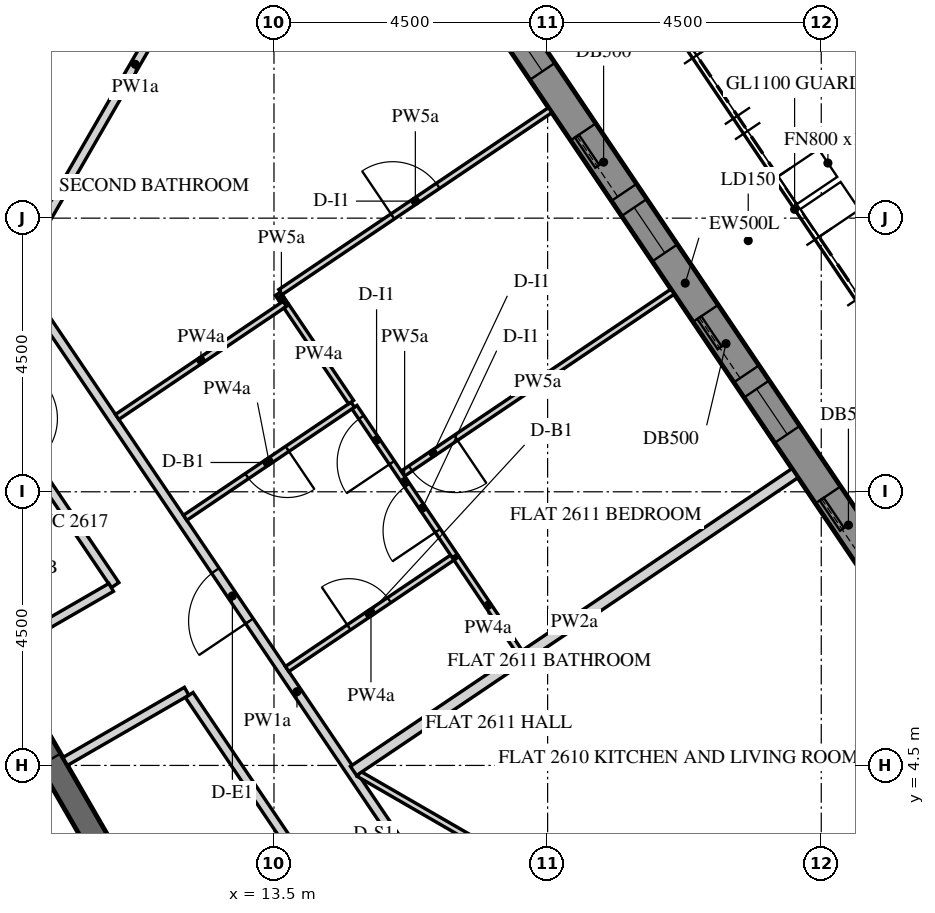
"""IFC4 building model, lengths in metres.
Left out: names, types, materials, properties, quantities, classifications, styles, units other than length and angle.
Written with IfcOpenShell. Run it as: python <this file> out.ifc"""

import sys

from ifc_helpers import new_model, si_unit, direction, frame, frame_2d, origin, place, context, subcontext, project, spatial, polyline, rectangle, outline, extrude, element, fill, save


model = new_model("IFC4")
c1 = context("Model", 3, precision=1e-05, world=origin(), true_north=direction((0.0, 1.0)))
c2 = subcontext(c1, "Body", "Model", "MODEL_VIEW")
j1 = project(units=[si_unit("LENGTHUNIT", "METRE"), si_unit("PLANEANGLEUNIT", "RADIAN")], contexts=[c1])
p1 = place(None, origin())
s1 = spatial("IfcSite", under=j1, at=p1, CompositionType="ELEMENT")
p2 = place(p1, origin())
s2 = spatial("IfcBuilding", under=s1, at=p2, CompositionType="ELEMENT")
p3 = place(p2, frame((0.0, 0.0, 326.4)))
s3 = spatial("IfcBuildingStorey", under=s2, at=p3, CompositionType="ELEMENT", Elevation=326.4)
p4 = place(p3, frame((26.706, 2.879, -0.15), z_axis=(0.0, 0.0, 1.0), x_axis=(-0.559197891507, 0.829034208061, 0.0)))
e1 = element("IfcWall", 1, at=p4, inside=s3, PredefinedType="SOLIDWALL", context=c2, shape_type="SweptSolid", body=[
    extrude(outline(polyline([(0.25, -0.25), (22.795, -0.25), (23.295, 0.25), (-0.25, 0.25), (0.25, -0.25)])), origin(), (0.0, 0.0, 1.0), 3.9),
])
p5 = place(p4, frame((1.323, 0.0, 1.05)))
e2 = element("IfcOpeningElement", 2, at=p5, cuts=e1, PredefinedType="OPENING", context=c2, shape_type="SweptSolid", body=[
    extrude(rectangle(XDim=0.9, YDim=1.5, at=frame_2d((0.45, 0.75))), frame((0.0, 0.26, 0.0), z_axis=(0.0, -1.0, 0.0), x_axis=(1.0, 0.0, 0.0)), (0.0, 0.0, 1.0), 0.52),
])
p6 = place(p4, frame((2.522, 0.0, 0.15)))
e3 = element("IfcOpeningElement", 3, at=p6, cuts=e1, PredefinedType="OPENING", context=c2, shape_type="SweptSolid", body=[
    extrude(rectangle(XDim=1.2, YDim=2.4, at=frame_2d((0.6, 1.2))), frame((0.0, 0.26, 0.0), z_axis=(0.0, -1.0, 0.0), x_axis=(1.0, 0.0, 0.0)), (0.0, 0.0, 1.0), 0.52),
])
p7 = place(p4, frame((4.922, 0.0, 1.05)))
e4 = element("IfcOpeningElement", 4, at=p7, cuts=e1, PredefinedType="OPENING", context=c2, shape_type="SweptSolid", body=[
    extrude(rectangle(XDim=0.9, YDim=1.5, at=frame_2d((0.45, 0.75))), frame((0.0, 0.26, 0.0), z_axis=(0.0, -1.0, 0.0), x_axis=(1.0, 0.0, 0.0)), (0.0, 0.0, 1.0), 0.52),
])
p8 = place(p4, frame((6.122, 0.0, 0.15)))
e5 = element("IfcOpeningElement", 5, at=p8, cuts=e1, PredefinedType="OPENING", context=c2, shape_type="SweptSolid", body=[
    extrude(rectangle(XDim=1.2, YDim=2.4, at=frame_2d((0.6, 1.2))), frame((0.0, 0.26, 0.0), z_axis=(0.0, -1.0, 0.0), x_axis=(1.0, 0.0, 0.0)), (0.0, 0.0, 1.0), 0.52),
])
p9 = place(p4, frame((8.522, 0.0, 1.05)))
e6 = element("IfcOpeningElement", 6, at=p9, cuts=e1, PredefinedType="OPENING", context=c2, shape_type="SweptSolid", body=[
    extrude(rectangle(XDim=0.9, YDim=1.5, at=frame_2d((0.45, 0.75))), frame((0.0, 0.26, 0.0), z_axis=(0.0, -1.0, 0.0), x_axis=(1.0, 0.0, 0.0)), (0.0, 0.0, 1.0), 0.52),
])
p10 = place(p4, frame((9.722, 0.0, 0.15)))
e7 = element("IfcOpeningElement", 7, at=p10, cuts=e1, PredefinedType="OPENING", context=c2, shape_type="SweptSolid", body=[
    extrude(rectangle(XDim=1.2, YDim=2.4, at=frame_2d((0.6, 1.2))), frame((0.0, 0.26, 0.0), z_axis=(0.0, -1.0, 0.0), x_axis=(1.0, 0.0, 0.0)), (0.0, 0.0, 1.0), 0.52),
])
p11 = place(p4, frame((12.122, 0.0, 1.05)))
e8 = element("IfcOpeningElement", 8, at=p11, cuts=e1, PredefinedType="OPENING", context=c2, shape_type="SweptSolid", body=[
    extrude(rectangle(XDim=0.9, YDim=1.5, at=frame_2d((0.45, 0.75))), frame((0.0, 0.26, 0.0), z_axis=(0.0, -1.0, 0.0), x_axis=(1.0, 0.0, 0.0)), (0.0, 0.0, 1.0), 0.52),
])
p12 = place(p4, frame((13.323, 0.0, 0.15)))
e9 = element("IfcOpeningElement", 9, at=p12, cuts=e1, PredefinedType="OPENING", context=c2, shape_type="SweptSolid", body=[
    extrude(rectangle(XDim=1.2, YDim=2.4, at=frame_2d((0.6, 1.2))), frame((0.0, 0.26, 0.0), z_axis=(0.0, -1.0, 0.0), x_axis=(1.0, 0.0, 0.0)), (0.0, 0.0, 1.0), 0.52),
])
p13 = place(p4, frame((15.722, 0.0, 1.05)))
e10 = element("IfcOpeningElement", 10, at=p13, cuts=e1, PredefinedType="OPENING", context=c2, shape_type="SweptSolid", body=[
    extrude(rectangle(XDim=0.9, YDim=1.5, at=frame_2d((0.45, 0.75))), frame((0.0, 0.26, 0.0), z_axis=(0.0, -1.0, 0.0), x_axis=(1.0, 0.0, 0.0)), (0.0, 0.0, 1.0), 0.52),
])
p14 = place(p4, frame((16.922, 0.0, 0.15)))
e11 = element("IfcOpeningElement", 11, at=p14, cuts=e1, PredefinedType="OPENING", context=c2, shape_type="SweptSolid", body=[
    extrude(rectangle(XDim=1.2, YDim=2.4, at=frame_2d((0.6, 1.2))), frame((0.0, 0.26, 0.0), z_axis=(0.0, -1.0, 0.0), x_axis=(1.0, 0.0, 0.0)), (0.0, 0.0, 1.0), 0.52),
])
p15 = place(p4, frame((19.323, 0.0, 1.05)))
e12 = element("IfcOpeningElement", 12, at=p15, cuts=e1, PredefinedType="OPENING", context=c2, shape_type="SweptSolid", body=[
    extrude(rectangle(XDim=0.9, YDim=1.5, at=frame_2d((0.45, 0.75))), frame((0.0, 0.26, 0.0), z_axis=(0.0, -1.0, 0.0), x_axis=(1.0, 0.0, 0.0)), (0.0, 0.0, 1.0), 0.52),
])
p16 = place(p4, frame((20.522, 0.0, 0.15)))
e13 = element("IfcOpeningElement", 13, at=p16, cuts=e1, PredefinedType="OPENING", context=c2, shape_type="SweptSolid", body=[
    extrude(rectangle(XDim=1.2, YDim=2.4, at=frame_2d((0.6, 1.2))), frame((0.0, 0.26, 0.0), z_axis=(0.0, -1.0, 0.0), x_axis=(1.0, 0.0, 0.0)), (0.0, 0.0, 1.0), 0.52),
])
p17 = place(p3, frame((12.471, 0.0, -0.15), z_axis=(0.0, 0.0, 1.0), x_axis=(-0.499996419489, 0.866027470984, 0.0)))
e14 = element("IfcWall", 14, at=p17, inside=s3, PredefinedType="SHEAR", context=c2, shape_type="SweptSolid", body=[
    extrude(outline(polyline([(-0.115, -0.2), (12.586, -0.2), (12.355, 0.2), (0.115, 0.2), (-0.115, -0.2)])), origin(), (0.0, 0.0, 1.0), 3.9),
])
p18 = place(p17, frame((5.306, 0.0, 0.15)))
e15 = element("IfcOpeningElement", 15, at=p18, cuts=e14, PredefinedType="OPENING", context=c2, shape_type="SweptSolid", body=[
    extrude(rectangle(XDim=1.8, YDim=2.4, at=frame_2d((0.9, 1.2))), frame((0.0, 0.21, 0.0), z_axis=(0.0, -1.0, 0.0), x_axis=(1.0, 0.0, 0.0)), (0.0, 0.0, 1.0), 0.42),
])
p19 = place(p3, frame((6.351, 11.0, -0.15), z_axis=(0.0, 0.0, 1.0), x_axis=(0.499998894578, 0.866026041999, 0.0)))
e16 = element("IfcWall", 16, at=p19, inside=s3, PredefinedType="SHEAR", context=c2, shape_type="SweptSolid", body=[
    extrude(rectangle(XDim=15.544, YDim=0.4, at=frame_2d((7.772, 0.0))), origin(), (0.0, 0.0, 1.0), 3.9),
])
p20 = place(p19, frame((6.872, 0.0, 0.15)))
e17 = element("IfcOpeningElement", 17, at=p20, cuts=e16, PredefinedType="OPENING", context=c2, shape_type="SweptSolid", body=[
    extrude(rectangle(XDim=1.8, YDim=2.4, at=frame_2d((0.9, 1.2))), frame((0.0, 0.21, 0.0), z_axis=(0.0, -1.0, 0.0), x_axis=(1.0, 0.0, 0.0)), (0.0, 0.0, 1.0), 0.42),
])
p21 = place(p3, frame((18.521, -1.171, 0.0), z_axis=(0.0, 0.0, 1.0), x_axis=(-0.559191021435, 0.829038842001, 0.0)))
e18 = element("IfcWall", 18, at=p21, inside=s3, PredefinedType="PARTITIONING", context=c2, shape_type="SweptSolid", body=[
    extrude(rectangle(XDim=16.605, YDim=0.15, at=frame_2d((8.303, 0.0))), origin(), (0.0, 0.0, 1.0), 2.838),
])
p22 = place(p21, frame((9.703, 0.0, 0.0)))
e19 = element("IfcOpeningElement", 19, at=p22, cuts=e18, PredefinedType="OPENING", context=c2, shape_type="SweptSolid", body=[
    extrude(rectangle(XDim=1.0, YDim=2.1, at=frame_2d((0.5, 1.05))), frame((0.0, 0.085, 0.0), z_axis=(0.0, -1.0, 0.0), x_axis=(1.0, 0.0, 0.0)), (0.0, 0.0, 1.0), 0.17),
])
p23 = place(p3, frame((9.277, 12.668, 0.0), z_axis=(0.0, 0.0, 1.0), x_axis=(0.499991012162, 0.866030592853, 0.0)))
e20 = element("IfcWall", 20, at=p23, inside=s3, PredefinedType="PARTITIONING", context=c2, shape_type="SweptSolid", body=[
    extrude(rectangle(XDim=7.764, YDim=0.15, at=frame_2d((3.882, 0.0))), origin(), (0.0, 0.0, 1.0), 2.838),
])
p24 = place(p3, frame((10.066, 4.566, 0.0), z_axis=(0.0, 0.0, 1.0), x_axis=(0.866034075723, 0.499984979461, 0.0)))
e21 = element("IfcWall", 21, at=p24, inside=s3, PredefinedType="PARTITIONING", context=c2, shape_type="SweptSolid", body=[
    extrude(rectangle(XDim=2.308, YDim=0.15, at=frame_2d((1.154, 0.0))), origin(), (0.0, 0.0, 1.0), 2.838),
])
p25 = place(p3, frame((12.106, 5.657, 0.0), z_axis=(0.0, 0.0, 1.0), x_axis=(0.559202573837, -0.829031049728, 0.0)))
e22 = element("IfcWall", 22, at=p25, inside=s3, PredefinedType="PARTITIONING", context=c2, shape_type="SweptSolid", body=[
    extrude(rectangle(XDim=8.394, YDim=0.15, at=frame_2d((4.197, 0.0))), origin(), (0.0, 0.0, 1.0), 2.838),
])
p26 = place(p25, frame((3.747, 0.0, 0.0)))
e23 = element("IfcOpeningElement", 23, at=p26, cuts=e22, PredefinedType="OPENING", context=c2, shape_type="SweptSolid", body=[
    extrude(rectangle(XDim=0.9, YDim=2.1, at=frame_2d((0.45, 1.05))), frame((0.0, 0.085, 0.0), z_axis=(0.0, -1.0, 0.0), x_axis=(1.0, 0.0, 0.0)), (0.0, 0.0, 1.0), 0.17),
])
p27 = place(p3, frame((7.694, 12.199, 0.0), z_axis=(0.0, 0.0, 1.0), x_axis=(0.55920112739, -0.829032025392, 0.0)))
e24 = element("IfcWall", 24, at=p27, inside=s3, PredefinedType="PARTITIONING", context=c2, shape_type="SweptSolid", body=[
    extrude(rectangle(XDim=5.71, YDim=0.15, at=frame_2d((2.855, 0.0))), origin(), (0.0, 0.0, 1.0), 2.838),
])
p28 = place(p27, frame((2.405, 0.0, 0.0)))
e25 = element("IfcOpeningElement", 25, at=p28, cuts=e24, PredefinedType="OPENING", context=c2, shape_type="SweptSolid", body=[
    extrude(rectangle(XDim=0.9, YDim=2.1, at=frame_2d((0.45, 1.05))), frame((0.0, 0.085, 0.0), z_axis=(0.0, -1.0, 0.0), x_axis=(1.0, 0.0, 0.0)), (0.0, 0.0, 1.0), 0.17),
])
p29 = place(p3, frame((10.822, 7.427, 0.0), z_axis=(0.0, 0.0, 1.0), x_axis=(-0.866016009309, -0.500016271356, 0.0)))
e26 = element("IfcWall", 26, at=p29, inside=s3, PredefinedType="PARTITIONING", context=c2, shape_type="SweptSolid", body=[
    extrude(rectangle(XDim=2.086, YDim=0.15, at=frame_2d((1.043, 0.0))), origin(), (0.0, 0.0, 1.0), 2.838),
])
p30 = place(p3, frame((14.896, 4.361, 0.0), z_axis=(0.0, 0.0, 1.0), x_axis=(0.866020874699, -0.500007844523, 0.0)))
e27 = element("IfcWall", 27, at=p30, inside=s3, PredefinedType="PARTITIONING", context=c2, shape_type="SweptSolid", body=[
    extrude(rectangle(XDim=9.38, YDim=0.1, at=frame_2d((4.69, 0.0))), origin(), (0.0, 0.0, 1.0), 2.838),
])
p31 = place(p3, frame((22.069, 9.307, 0.0), z_axis=(0.0, 0.0, 1.0), x_axis=(-0.829040270775, -0.559188903174, 0.0)))
e28 = element("IfcWall", 28, at=p31, inside=s3, PredefinedType="PARTITIONING", context=c2, shape_type="SweptSolid", body=[
    extrude(rectangle(XDim=8.758, YDim=0.18, at=frame_2d((4.379, 0.0))), origin(), (0.0, 0.0, 1.0), 2.838),
])
p32 = place(p3, frame((13.678, 12.089, 0.0), z_axis=(0.0, 0.0, 1.0), x_axis=(-0.559431350648, 0.828876688001, 0.0)))
e29 = element("IfcWall", 29, at=p32, inside=s3, PredefinedType="PARTITIONING", context=c2, shape_type="SweptSolid", body=[
    extrude(rectangle(XDim=0.202, YDim=0.1, at=frame_2d((0.101, 0.0))), origin(), (0.0, 0.0, 1.0), 2.838),
])
p33 = place(p3, frame((13.607, 12.284, 0.0), z_axis=(0.0, 0.0, 1.0), x_axis=(0.829033261565, 0.559199294722, 0.0)))
e30 = element("IfcWall", 30, at=p33, inside=s3, PredefinedType="PARTITIONING", context=c2, shape_type="SweptSolid", body=[
    extrude(rectangle(XDim=5.35, YDim=0.1, at=frame_2d((2.675, 0.0))), origin(), (0.0, 0.0, 1.0), 2.838),
])
p34 = place(p33, frame((2.225, 0.0, 0.0)))
e31 = element("IfcOpeningElement", 31, at=p34, cuts=e30, PredefinedType="OPENING", context=c2, shape_type="SweptSolid", body=[
    extrude(rectangle(XDim=0.9, YDim=2.1, at=frame_2d((0.45, 1.05))), frame((0.0, 0.06, 0.0), z_axis=(0.0, -1.0, 0.0), x_axis=(1.0, 0.0, 0.0)), (0.0, 0.0, 1.0), 0.12),
])
p35 = place(p3, frame((10.921, 10.231, 0.0), z_axis=(0.0, 0.0, 1.0), x_axis=(0.829010378124, 0.559233218759, 0.0)))
e32 = element("IfcWall", 32, at=p35, inside=s3, PredefinedType="PARTITIONING", context=c2, shape_type="SweptSolid", body=[
    extrude(rectangle(XDim=3.325, YDim=0.1, at=frame_2d((1.663, 0.0))), origin(), (0.0, 0.0, 1.0), 2.838),
])
p36 = place(p3, frame((13.717, 6.086, 0.0), z_axis=(0.0, 0.0, 1.0), x_axis=(0.829067379225, 0.559148710725, 0.0)))
e33 = element("IfcWall", 33, at=p36, inside=s3, PredefinedType="PARTITIONING", context=c2, shape_type="SweptSolid", body=[
    extrude(rectangle(XDim=3.325, YDim=0.1, at=frame_2d((1.663, 0.0))), origin(), (0.0, 0.0, 1.0), 2.838),
])
p37 = place(p36, frame((1.225, 0.0, 0.0)))
e34 = element("IfcOpeningElement", 34, at=p37, cuts=e33, PredefinedType="OPENING", context=c2, shape_type="SweptSolid", body=[
    extrude(rectangle(XDim=0.8, YDim=2.1, at=frame_2d((0.4, 1.05))), frame((0.0, 0.06, 0.0), z_axis=(0.0, -1.0, 0.0), x_axis=(1.0, 0.0, 0.0)), (0.0, 0.0, 1.0), 0.12),
])
p38 = place(p3, frame((16.474, 7.944, 0.0), z_axis=(0.0, 0.0, 1.0), x_axis=(-0.559193191328, 0.829037378393, 0.0)))
e35 = element("IfcWall", 35, at=p38, inside=s3, PredefinedType="PARTITIONING", context=c2, shape_type="SweptSolid", body=[
    extrude(rectangle(XDim=2.954, YDim=0.1, at=frame_2d((1.477, 0.0))), origin(), (0.0, 0.0, 1.0), 2.838),
])
p39 = place(p38, frame((0.502, 0.0, 0.0)))
e36 = element("IfcOpeningElement", 36, at=p39, cuts=e35, PredefinedType="OPENING", context=c2, shape_type="SweptSolid", body=[
    extrude(rectangle(XDim=0.9, YDim=2.1, at=frame_2d((0.45, 1.05))), frame((0.0, 0.06, 0.0), z_axis=(0.0, -1.0, 0.0), x_axis=(1.0, 0.0, 0.0)), (0.0, 0.0, 1.0), 0.12),
])
p40 = place(p38, frame((1.852, 0.0, 0.0)))
e37 = element("IfcOpeningElement", 37, at=p40, cuts=e35, PredefinedType="OPENING", context=c2, shape_type="SweptSolid", body=[
    extrude(rectangle(XDim=0.9, YDim=2.1, at=frame_2d((0.45, 1.05))), frame((0.0, 0.06, 0.0), z_axis=(0.0, -1.0, 0.0), x_axis=(1.0, 0.0, 0.0)), (0.0, 0.0, 1.0), 0.12),
])
p41 = place(p3, frame((14.796, 10.433, 0.0), z_axis=(0.0, 0.0, 1.0), x_axis=(-0.82903334026, -0.559199178055, 0.0)))
e38 = element("IfcWall", 38, at=p41, inside=s3, PredefinedType="PARTITIONING", context=c2, shape_type="SweptSolid", body=[
    extrude(rectangle(XDim=3.325, YDim=0.1, at=frame_2d((1.663, 0.0))), origin(), (0.0, 0.0, 1.0), 2.838),
])
p42 = place(p41, frame((1.3, 0.0, 0.0)))
e39 = element("IfcOpeningElement", 39, at=p42, cuts=e38, PredefinedType="OPENING", context=c2, shape_type="SweptSolid", body=[
    extrude(rectangle(XDim=0.8, YDim=2.1, at=frame_2d((0.4, 1.05))), frame((0.0, 0.06, 0.0), z_axis=(0.0, -1.0, 0.0), x_axis=(1.0, 0.0, 0.0)), (0.0, 0.0, 1.0), 0.12),
])
p43 = place(p3, frame((17.541, 6.362, 0.0), z_axis=(0.0, 0.0, 1.0), x_axis=(-0.559110227504, 0.829093332201, 0.0)))
e40 = element("IfcWall", 40, at=p43, inside=s3, PredefinedType="PARTITIONING", context=c2, shape_type="SweptSolid", body=[
    extrude(rectangle(XDim=1.862, YDim=0.1, at=frame_2d((0.931, 0.0))), origin(), (0.0, 0.0, 1.0), 2.838),
])
p44 = place(p3, frame((20.055, 12.292, 0.0), z_axis=(0.0, 0.0, 1.0), x_axis=(-0.829033261565, -0.559199294722, 0.0)))
e41 = element("IfcWall", 41, at=p44, inside=s3, PredefinedType="PARTITIONING", context=c2, shape_type="SweptSolid", body=[
    extrude(rectangle(XDim=5.35, YDim=0.1, at=frame_2d((2.675, 0.0))), origin(), (0.0, 0.0, 1.0), 2.838),
])
p45 = place(p44, frame((4.3, 0.0, 0.0)))
e42 = element("IfcOpeningElement", 42, at=p45, cuts=e41, PredefinedType="OPENING", context=c2, shape_type="SweptSolid", body=[
    extrude(rectangle(XDim=0.9, YDim=2.1, at=frame_2d((0.45, 1.05))), frame((0.0, 0.06, 0.0), z_axis=(0.0, -1.0, 0.0), x_axis=(1.0, 0.0, 0.0)), (0.0, 0.0, 1.0), 0.12),
])
p46 = place(p3, frame((13.705, 12.049, 0.0), z_axis=(0.0, 0.0, 1.0), x_axis=(0.559199178055, -0.82903334026, 0.0)))
e43 = element("IfcWall", 43, at=p46, inside=s3, PredefinedType="PARTITIONING", context=c2, shape_type="SweptSolid", body=[
    extrude(rectangle(XDim=1.9, YDim=0.1, at=frame_2d((0.95, 0.0))), origin(), (0.0, 0.0, 1.0), 2.838),
])
p47 = place(p8, frame((0.0, 0.175, 0.0)))
e44 = element("IfcDoor", 44, at=p47, inside=s3, OperationType="SLIDING_TO_LEFT", PredefinedType="DOOR", context=c2, shape_type="SweptSolid", body=[
    extrude(rectangle(XDim=1.2, YDim=2.4, at=frame_2d((0.6, 1.2))), frame((0.0, 0.025, 0.0), z_axis=(0.0, -1.0, 0.0), x_axis=(1.0, 0.0, 0.0)), (0.0, 0.0, 1.0), 0.05),
])
fill(e5, e44)
p48 = place(p9, frame((0.0, 0.18, 0.0)))
e45 = element("IfcWindow", 45, at=p48, inside=s3, PartitioningType="SINGLE_PANEL", PredefinedType="WINDOW", context=c2, shape_type="SweptSolid", body=[
    extrude(rectangle(XDim=0.9, YDim=1.5, at=frame_2d((0.45, 0.75))), frame((0.0, 0.03, 0.0), z_axis=(0.0, -1.0, 0.0), x_axis=(1.0, 0.0, 0.0)), (0.0, 0.0, 1.0), 0.06),
])
fill(e6, e45)
p49 = place(p10, frame((0.0, 0.175, 0.0)))
e46 = element("IfcDoor", 46, at=p49, inside=s3, OperationType="SLIDING_TO_LEFT", PredefinedType="DOOR", context=c2, shape_type="SweptSolid", body=[
    extrude(rectangle(XDim=1.2, YDim=2.4, at=frame_2d((0.6, 1.2))), frame((0.0, 0.025, 0.0), z_axis=(0.0, -1.0, 0.0), x_axis=(1.0, 0.0, 0.0)), (0.0, 0.0, 1.0), 0.05),
])
fill(e7, e46)
p50 = place(p11, frame((0.0, 0.18, 0.0)))
e47 = element("IfcWindow", 47, at=p50, inside=s3, PartitioningType="SINGLE_PANEL", PredefinedType="WINDOW", context=c2, shape_type="SweptSolid", body=[
    extrude(rectangle(XDim=0.9, YDim=1.5, at=frame_2d((0.45, 0.75))), frame((0.0, 0.03, 0.0), z_axis=(0.0, -1.0, 0.0), x_axis=(1.0, 0.0, 0.0)), (0.0, 0.0, 1.0), 0.06),
])
fill(e8, e47)
p51 = place(p12, frame((0.0, 0.175, 0.0)))
e48 = element("IfcDoor", 48, at=p51, inside=s3, OperationType="SLIDING_TO_LEFT", PredefinedType="DOOR", context=c2, shape_type="SweptSolid", body=[
    extrude(rectangle(XDim=1.2, YDim=2.4, at=frame_2d((0.6, 1.2))), frame((0.0, 0.025, 0.0), z_axis=(0.0, -1.0, 0.0), x_axis=(1.0, 0.0, 0.0)), (0.0, 0.0, 1.0), 0.05),
])
fill(e9, e48)
p52 = place(p13, frame((0.0, 0.18, 0.0)))
e49 = element("IfcWindow", 49, at=p52, inside=s3, PartitioningType="SINGLE_PANEL", PredefinedType="WINDOW", context=c2, shape_type="SweptSolid", body=[
    extrude(rectangle(XDim=0.9, YDim=1.5, at=frame_2d((0.45, 0.75))), frame((0.0, 0.03, 0.0), z_axis=(0.0, -1.0, 0.0), x_axis=(1.0, 0.0, 0.0)), (0.0, 0.0, 1.0), 0.06),
])
fill(e10, e49)
p53 = place(p22, origin())
e50 = element("IfcDoor", 50, at=p53, inside=s3, OperationType="SINGLE_SWING_RIGHT", PredefinedType="DOOR", context=c2, shape_type="SweptSolid", body=[
    extrude(rectangle(XDim=1.0, YDim=2.1, at=frame_2d((0.5, 1.05))), frame((0.0, 0.025, 0.0), z_axis=(0.0, -1.0, 0.0), x_axis=(1.0, 0.0, 0.0)), (0.0, 0.0, 1.0), 0.05),
])
fill(e19, e50)
p54 = place(p37, origin())
e51 = element("IfcDoor", 51, at=p54, inside=s3, OperationType="SINGLE_SWING_RIGHT", PredefinedType="DOOR", context=c2, shape_type="SweptSolid", body=[
    extrude(rectangle(XDim=0.8, YDim=2.1, at=frame_2d((0.4, 1.05))), frame((0.0, 0.025, 0.0), z_axis=(0.0, -1.0, 0.0), x_axis=(1.0, 0.0, 0.0)), (0.0, 0.0, 1.0), 0.05),
])
fill(e34, e51)
p55 = place(p39, origin())
e52 = element("IfcDoor", 52, at=p55, inside=s3, OperationType="SINGLE_SWING_LEFT", PredefinedType="DOOR", context=c2, shape_type="SweptSolid", body=[
    extrude(rectangle(XDim=0.9, YDim=2.1, at=frame_2d((0.45, 1.05))), frame((0.0, 0.025, 0.0), z_axis=(0.0, -1.0, 0.0), x_axis=(1.0, 0.0, 0.0)), (0.0, 0.0, 1.0), 0.05),
])
fill(e36, e52)
p56 = place(p45, origin())
e53 = element("IfcDoor", 53, at=p56, inside=s3, OperationType="SINGLE_SWING_RIGHT", PredefinedType="DOOR", context=c2, shape_type="SweptSolid", body=[
    extrude(rectangle(XDim=0.9, YDim=2.1, at=frame_2d((0.45, 1.05))), frame((0.0, 0.025, 0.0), z_axis=(0.0, -1.0, 0.0), x_axis=(1.0, 0.0, 0.0)), (0.0, 0.0, 1.0), 0.05),
])
fill(e42, e53)
p57 = place(p40, origin())
e54 = element("IfcDoor", 54, at=p57, inside=s3, OperationType="SINGLE_SWING_RIGHT", PredefinedType="DOOR", context=c2, shape_type="SweptSolid", body=[
    extrude(rectangle(XDim=0.9, YDim=2.1, at=frame_2d((0.45, 1.05))), frame((0.0, 0.025, 0.0), z_axis=(0.0, -1.0, 0.0), x_axis=(1.0, 0.0, 0.0)), (0.0, 0.0, 1.0), 0.05),
])
fill(e37, e54)
p58 = place(p42, origin())
e55 = element("IfcDoor", 55, at=p58, inside=s3, OperationType="SINGLE_SWING_LEFT", PredefinedType="DOOR", context=c2, shape_type="SweptSolid", body=[
    extrude(rectangle(XDim=0.8, YDim=2.1, at=frame_2d((0.4, 1.05))), frame((0.0, 0.025, 0.0), z_axis=(0.0, -1.0, 0.0), x_axis=(1.0, 0.0, 0.0)), (0.0, 0.0, 1.0), 0.05),
])
fill(e39, e55)
p59 = place(p34, origin())
e56 = element("IfcDoor", 56, at=p59, inside=s3, OperationType="SINGLE_SWING_RIGHT", PredefinedType="DOOR", context=c2, shape_type="SweptSolid", body=[
    extrude(rectangle(XDim=0.9, YDim=2.1, at=frame_2d((0.45, 1.05))), frame((0.0, 0.025, 0.0), z_axis=(0.0, -1.0, 0.0), x_axis=(1.0, 0.0, 0.0)), (0.0, 0.0, 1.0), 0.05),
])
fill(e31, e56)
save(model, sys.argv[1])
